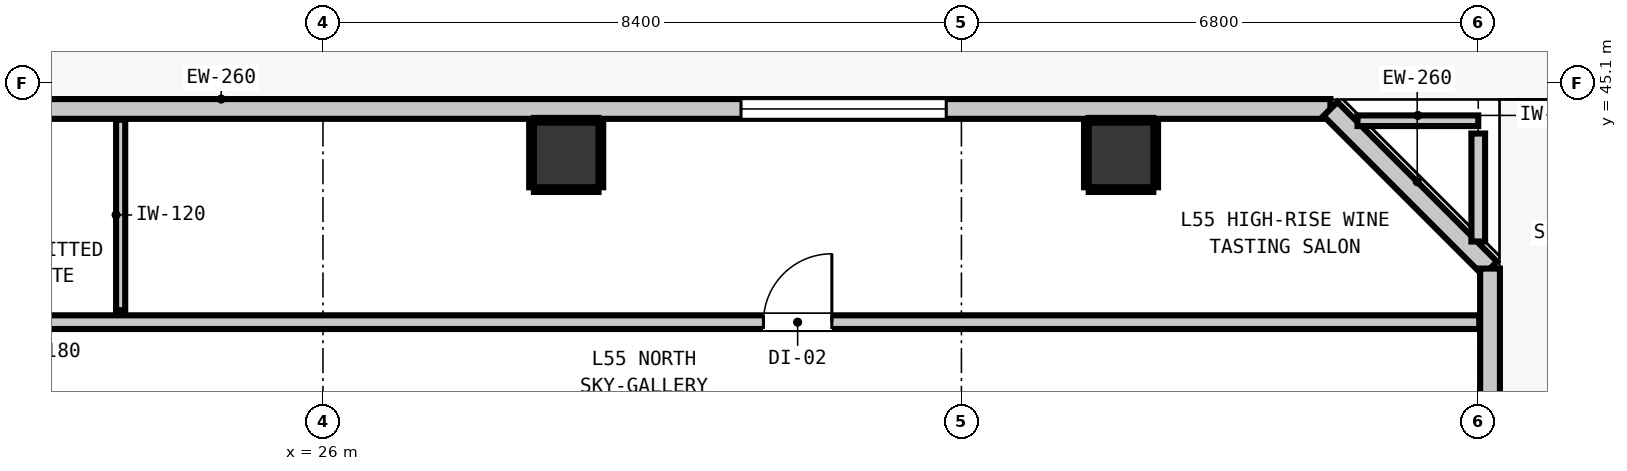
"""IFC4 building model, lengths in metres.
Left out: names, types, materials, properties, quantities, classifications, styles, units other than length and angle.
Written with IfcOpenShell. Run it as: python <this file> out.ifc"""

import sys

from ifc_helpers import new_model, si_unit, direction, frame, frame_2d, origin, origin_2d, place, context, subcontext, project, spatial, rectangle, extrude, element, fill, save


model = new_model("IFC4")
c1 = context("Model", 3, precision=1e-05, world=origin(), true_north=direction((0.0, 1.0)))
c2 = subcontext(c1, "Body", "Model", "MODEL_VIEW")
j1 = project(units=[si_unit("LENGTHUNIT", "METRE"), si_unit("PLANEANGLEUNIT", "RADIAN")], contexts=[c1])
p1 = place(None, origin())
s1 = spatial("IfcSite", under=j1, at=p1, CompositionType="ELEMENT")
p2 = place(p1, origin())
s2 = spatial("IfcBuilding", under=s1, at=p2, CompositionType="ELEMENT")
p3 = place(p2, frame((0.0, 0.0, 190.16)))
s3 = spatial("IfcBuildingStorey", under=s2, at=p3, CompositionType="ELEMENT", Elevation=190.16)
for number, where, z_axis, x_axis in (
    (1, (29.2, 44.15, -0.2), (0.0, 0.0, 1.0), (1.0, 0.0, 0.0)),
    (2, (36.5, 44.15, -0.2), (0.0, 0.0, 1.0), (1.0, 0.0, 0.0)),
):
    element("IfcColumn", number, at=place(p3, frame(where, z_axis=z_axis, x_axis=x_axis)), inside=s3, PredefinedType="COLUMN", context=c2, shape_type="SweptSolid", body=[
        extrude(rectangle(XDim=0.85, YDim=0.85, at=origin_2d()), origin(), (0.0, 0.0, 1.0), 3.52),
    ])
p4 = place(p3, frame((6.545, 44.755, 0.0), z_axis=(0.0, 0.0, 1.0), x_axis=(1.0, 0.0, 0.0)))
e3 = element("IfcWall", 3, at=p4, inside=s3, PredefinedType="STANDARD", context=c2, shape_type="SweptSolid", body=[
    extrude(rectangle(XDim=32.71, YDim=0.26, at=frame_2d((16.355, 0.0))), origin(), (0.0, 0.0, 1.0), 3.1),
])
p5 = place(p4, frame((0.857, 0.0, 0.0)))
e4 = element("IfcOpeningElement", 4, at=p5, cuts=e3, PredefinedType="OPENING", context=c2, shape_type="SweptSolid", body=[
    extrude(rectangle(XDim=1.1, YDim=2.15, at=frame_2d((0.55, 1.075))), frame((0.0, 0.14, 0.0), z_axis=(0.0, -1.0, 0.0), x_axis=(1.0, 0.0, 0.0)), (0.0, 0.0, 1.0), 0.28),
])
p6 = place(p4, frame((8.577, 0.0, 0.85)))
e5 = element("IfcOpeningElement", 5, at=p6, cuts=e3, PredefinedType="OPENING", context=c2, shape_type="SweptSolid", body=[
    extrude(rectangle(XDim=2.7, YDim=2.0, at=frame_2d((1.35, 1.0))), frame((0.0, 0.14, 0.0), z_axis=(0.0, -1.0, 0.0), x_axis=(1.0, 0.0, 0.0)), (0.0, 0.0, 1.0), 0.28),
])
p7 = place(p4, frame((24.955, 0.0, 0.85)))
e6 = element("IfcOpeningElement", 6, at=p7, cuts=e3, PredefinedType="OPENING", context=c2, shape_type="SweptSolid", body=[
    extrude(rectangle(XDim=2.7, YDim=2.0, at=frame_2d((1.35, 1.0))), frame((0.0, 0.14, 0.0), z_axis=(0.0, -1.0, 0.0), x_axis=(1.0, 0.0, 0.0)), (0.0, 0.0, 1.0), 0.28),
])
p8 = place(p3, frame((39.255, 44.755, 0.0), z_axis=(0.0, 0.0, 1.0), x_axis=(0.707147883682, -0.707065676302, 0.0)))
e7 = element("IfcWall", 7, at=p8, inside=s3, PredefinedType="STANDARD", context=c2, shape_type="SweptSolid", body=[
    extrude(rectangle(XDim=2.97, YDim=0.26, at=frame_2d((1.485, 0.0))), origin(), (0.0, 0.0, 1.0), 3.1),
])
p9 = place(p3, frame((41.355, 42.655, 0.0), z_axis=(0.0, 0.0, 1.0), x_axis=(0.0, -1.0, 0.0)))
e8 = element("IfcWall", 8, at=p9, inside=s3, PredefinedType="STANDARD", context=c2, shape_type="SweptSolid", body=[
    extrude(rectangle(XDim=30.31, YDim=0.26, at=frame_2d((15.155, 0.0))), origin(), (0.0, 0.0, 1.0), 3.1),
])
p10 = place(p9, frame((23.768, 0.0, 0.0)))
e9 = element("IfcOpeningElement", 9, at=p10, cuts=e8, PredefinedType="OPENING", context=c2, shape_type="SweptSolid", body=[
    extrude(rectangle(XDim=1.1, YDim=2.15, at=frame_2d((0.55, 1.075))), frame((0.0, 0.14, 0.0), z_axis=(0.0, -1.0, 0.0), x_axis=(1.0, 0.0, 0.0)), (0.0, 0.0, 1.0), 0.28),
])
p11 = place(p9, frame((25.507, 0.0, 0.85)))
e10 = element("IfcOpeningElement", 10, at=p11, cuts=e8, PredefinedType="OPENING", context=c2, shape_type="SweptSolid", body=[
    extrude(rectangle(XDim=1.05, YDim=1.65, at=frame_2d((0.525, 0.825))), frame((0.0, 0.14, 0.0), z_axis=(0.0, -1.0, 0.0), x_axis=(1.0, 0.0, 0.0)), (0.0, 0.0, 1.0), 0.28),
])
p12 = place(p9, frame((27.358, 0.0, 0.85)))
e11 = element("IfcOpeningElement", 11, at=p12, cuts=e8, PredefinedType="OPENING", context=c2, shape_type="SweptSolid", body=[
    extrude(rectangle(XDim=2.7, YDim=2.0, at=frame_2d((1.35, 1.0))), frame((0.0, 0.14, 0.0), z_axis=(0.0, -1.0, 0.0), x_axis=(1.0, 0.0, 0.0)), (0.0, 0.0, 1.0), 0.28),
])
p13 = place(p3, frame((13.012, 41.95, 0.0), z_axis=(0.0, 0.0, 1.0), x_axis=(1.0, 0.0, 0.0)))
e12 = element("IfcWall", 12, at=p13, inside=s3, PredefinedType="PARTITIONING", context=c2, shape_type="SweptSolid", body=[
    extrude(rectangle(XDim=28.201, YDim=0.18, at=frame_2d((14.101, 0.0))), origin(), (0.0, 0.0, 1.0), 3.1),
])
p14 = place(p13, frame((18.783, 0.0, 0.0)))
e13 = element("IfcOpeningElement", 13, at=p14, cuts=e12, PredefinedType="OPENING", context=c2, shape_type="SweptSolid", body=[
    extrude(rectangle(XDim=0.9, YDim=2.1, at=frame_2d((0.45, 1.05))), frame((0.0, 0.1, 0.0), z_axis=(0.0, -1.0, 0.0), x_axis=(1.0, 0.0, 0.0)), (0.0, 0.0, 1.0), 0.2),
])
p15 = place(p3, frame((39.611, 44.6, 0.0), z_axis=(0.0, 0.0, 1.0), x_axis=(1.0, 0.0, 0.0)))
e14 = element("IfcWall", 14, at=p15, inside=s3, PredefinedType="PARTITIONING", context=c2, shape_type="SweptSolid", body=[
    extrude(rectangle(XDim=1.589, YDim=0.14, at=frame_2d((0.794, 0.0))), origin(), (0.0, 0.0, 1.0), 3.1),
])
p16 = place(p3, frame((41.2, 43.011, 0.0), z_axis=(0.0, 0.0, 1.0), x_axis=(0.0, 1.0, 0.0)))
e15 = element("IfcWall", 15, at=p16, inside=s3, PredefinedType="PARTITIONING", context=c2, shape_type="SweptSolid", body=[
    extrude(rectangle(XDim=1.421, YDim=0.18, at=frame_2d((0.71, 0.0))), origin(), (0.0, 0.0, 1.0), 3.1),
])
p17 = place(p3, frame((23.338, 42.108, 0.0), z_axis=(0.0, 0.0, 1.0), x_axis=(0.0, 1.0, 0.0)))
e16 = element("IfcWall", 16, at=p17, inside=s3, PredefinedType="PARTITIONING", context=c2, shape_type="SweptSolid", body=[
    extrude(rectangle(XDim=2.505, YDim=0.12, at=frame_2d((1.252, 0.0))), origin(), (0.0, 0.0, 1.0), 3.1),
])
for number, where, z_axis, x_axis in (
    (17, (28.775, 43.693, 0.0), (0.0, 0.0, 1.0), (1.0, 0.0, 0.0)),
    (18, (28.775, 44.607, 0.0), (0.0, 0.0, 1.0), (1.0, 0.0, 0.0)),
):
    element("IfcWall", number, at=place(p3, frame(where, z_axis=z_axis, x_axis=x_axis)), inside=s3, PredefinedType="PARTITIONING", context=c2, shape_type="SweptSolid", body=[
        extrude(rectangle(XDim=0.85, YDim=0.06, at=frame_2d((0.425, 0.0))), origin(), (0.0, 0.0, 1.0), 1.45),
    ])
for number, where, z_axis, x_axis in (
    (19, (28.743, 43.725, 0.0), (0.0, 0.0, 1.0), (0.0, 1.0, 0.0)),
    (20, (29.657, 43.725, 0.0), (0.0, 0.0, 1.0), (0.0, 1.0, 0.0)),
):
    element("IfcWall", number, at=place(p3, frame(where, z_axis=z_axis, x_axis=x_axis)), inside=s3, PredefinedType="PARTITIONING", context=c2, shape_type="SweptSolid", body=[
        extrude(rectangle(XDim=0.85, YDim=0.06, at=frame_2d((0.425, 0.0))), origin(), (0.0, 0.0, 1.0), 1.45),
    ])
for number, where, z_axis, x_axis in (
    (21, (36.075, 43.693, 0.0), (0.0, 0.0, 1.0), (1.0, 0.0, 0.0)),
    (22, (36.075, 44.607, 0.0), (0.0, 0.0, 1.0), (1.0, 0.0, 0.0)),
):
    element("IfcWall", number, at=place(p3, frame(where, z_axis=z_axis, x_axis=x_axis)), inside=s3, PredefinedType="PARTITIONING", context=c2, shape_type="SweptSolid", body=[
        extrude(rectangle(XDim=0.85, YDim=0.06, at=frame_2d((0.425, 0.0))), origin(), (0.0, 0.0, 1.0), 1.45),
    ])
for number, where, z_axis, x_axis in (
    (23, (36.043, 43.725, 0.0), (0.0, 0.0, 1.0), (0.0, 1.0, 0.0)),
    (24, (36.957, 43.725, 0.0), (0.0, 0.0, 1.0), (0.0, 1.0, 0.0)),
):
    element("IfcWall", number, at=place(p3, frame(where, z_axis=z_axis, x_axis=x_axis)), inside=s3, PredefinedType="PARTITIONING", context=c2, shape_type="SweptSolid", body=[
        extrude(rectangle(XDim=0.85, YDim=0.06, at=frame_2d((0.425, 0.0))), origin(), (0.0, 0.0, 1.0), 1.45),
    ])
p18 = place(p7, origin())
e25 = element("IfcWindow", 25, at=p18, inside=s3, PartitioningType="SINGLE_PANEL", PredefinedType="WINDOW", context=c2, shape_type="SweptSolid", body=[
    extrude(rectangle(XDim=2.7, YDim=2.0, at=frame_2d((1.35, 1.0))), frame((0.0, 0.03, 0.0), z_axis=(0.0, -1.0, 0.0), x_axis=(1.0, 0.0, 0.0)), (0.0, 0.0, 1.0), 0.06),
])
fill(e6, e25)
p19 = place(p14, origin())
e26 = element("IfcDoor", 26, at=p19, inside=s3, OperationType="SINGLE_SWING_RIGHT", PredefinedType="DOOR", context=c2, shape_type="SweptSolid", body=[
    extrude(rectangle(XDim=0.9, YDim=2.1, at=frame_2d((0.45, 1.05))), frame((0.0, 0.025, 0.0), z_axis=(0.0, -1.0, 0.0), x_axis=(1.0, 0.0, 0.0)), (0.0, 0.0, 1.0), 0.05),
])
fill(e13, e26)
save(model, sys.argv[1])
